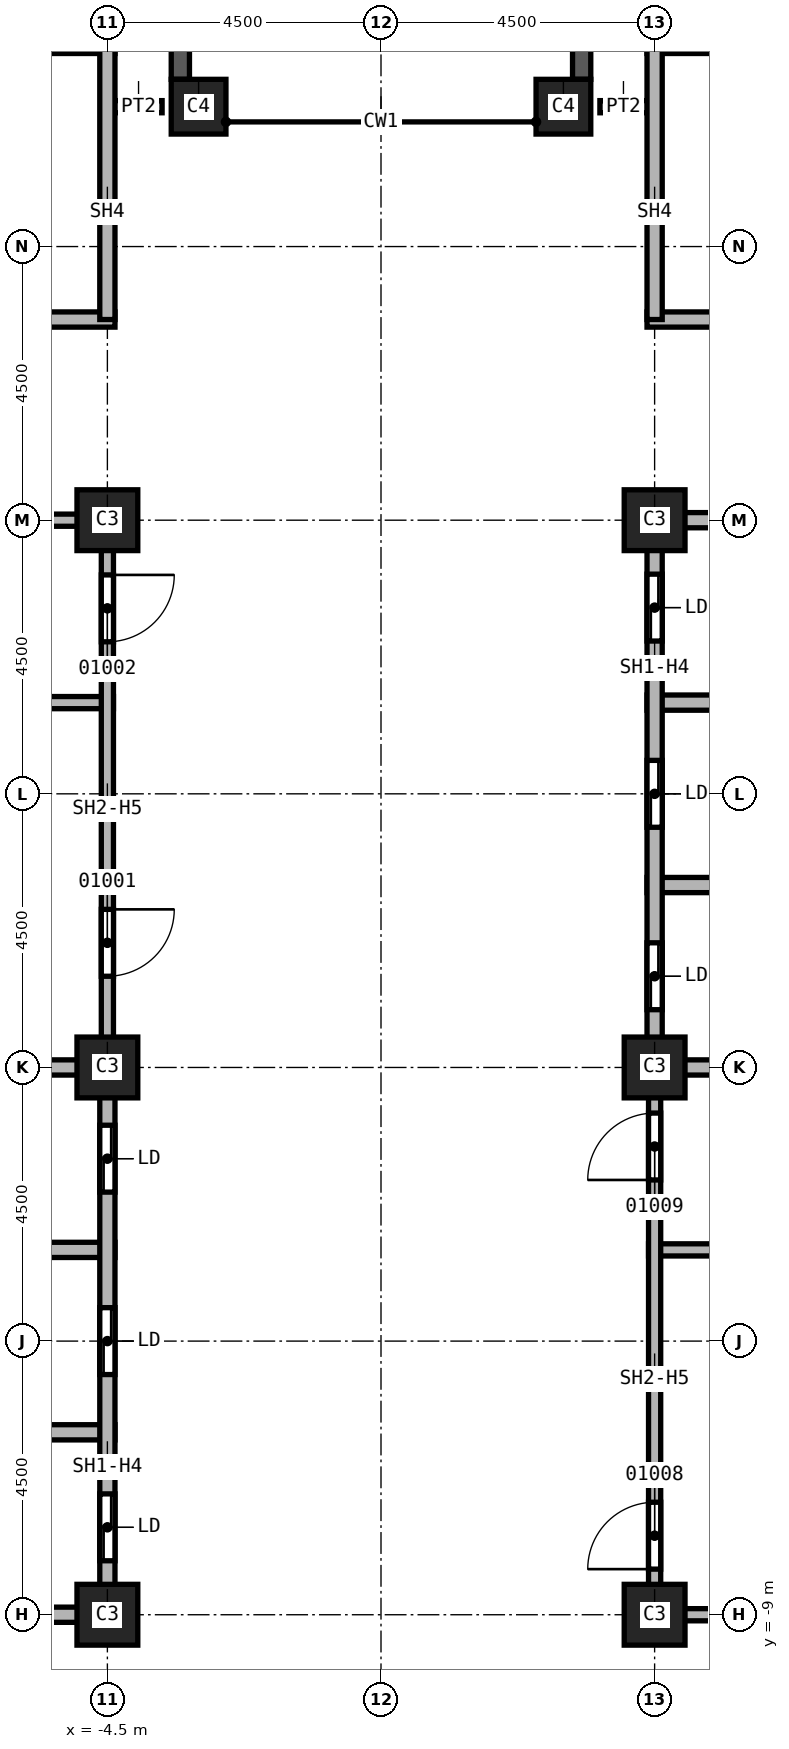
"""IFC4 building model, lengths in metres.
Left out: names, types, materials, properties, quantities, classifications, styles, units other than length and angle.
Written with IfcOpenShell. Run it as: python <this file> out.ifc"""

import sys

from ifc_helpers import new_model, si_unit, direction, frame, frame_2d, origin, origin_2d, place, context, subcontext, project, spatial, rectangle, extrude, element, fill, save


model = new_model("IFC4")
c1 = context("Model", 3, precision=1e-05, world=origin(), true_north=direction((0.0, 1.0)))
c2 = subcontext(c1, "Body", "Model", "MODEL_VIEW")
j1 = project(units=[si_unit("LENGTHUNIT", "METRE"), si_unit("PLANEANGLEUNIT", "RADIAN")], contexts=[c1])
p1 = place(None, origin())
s1 = spatial("IfcSite", under=j1, at=p1, CompositionType="ELEMENT")
p2 = place(p1, origin())
s2 = spatial("IfcBuilding", under=s1, at=p2, CompositionType="ELEMENT")
p3 = place(p2, frame((0.0, 0.0, 72.0)))
s3 = spatial("IfcBuildingStorey", under=s2, at=p3, CompositionType="ELEMENT", Elevation=72.0)
for number, where, z_axis, x_axis in (
    (1, (4.5, 0.0, 0.0), (0.0, 0.0, 1.0), (1.0, 0.0, 0.0)),
    (2, (4.5, 9.0, 0.0), (0.0, 0.0, 1.0), (1.0, 0.0, 0.0)),
    (3, (4.5, -9.0, 0.0), (0.0, 0.0, 1.0), (1.0, 0.0, 0.0)),
    (4, (-4.5, 0.0, 0.0), (0.0, 0.0, 1.0), (1.0, 0.0, 0.0)),
    (5, (-4.5, 9.0, 0.0), (0.0, 0.0, 1.0), (1.0, 0.0, 0.0)),
    (6, (-4.5, -9.0, 0.0), (0.0, 0.0, 1.0), (1.0, 0.0, 0.0)),
):
    element("IfcColumn", number, at=place(p3, frame(where, z_axis=z_axis, x_axis=x_axis)), inside=s3, PredefinedType="COLUMN", context=c2, shape_type="SweptSolid", body=[
        extrude(rectangle(XDim=1.0, YDim=1.0, at=origin_2d()), origin(), (0.0, 0.0, 1.0), 3.7),
    ])
for number, where, z_axis, x_axis in (
    (7, (3.0, 15.8, 0.0), (0.0, 0.0, 1.0), (1.0, 0.0, 0.0)),
    (8, (-3.0, 15.8, 0.0), (0.0, 0.0, 1.0), (1.0, 0.0, 0.0)),
):
    element("IfcColumn", number, at=place(p3, frame(where, z_axis=z_axis, x_axis=x_axis)), inside=s3, PredefinedType="COLUMN", context=c2, shape_type="SweptSolid", body=[
        extrude(rectangle(XDim=0.9, YDim=0.9, at=origin_2d()), origin(), (0.0, 0.0, 1.0), 3.7),
    ])
p4 = place(p3, frame((3.3, 24.2, 0.0), z_axis=(0.0, 0.0, 1.0), x_axis=(0.0, -1.0, 0.0)))
e9 = element("IfcWall", 9, at=p4, inside=s3, PredefinedType="SOLIDWALL", context=c2, shape_type="SweptSolid", body=[
    extrude(rectangle(XDim=7.95, YDim=0.3, at=frame_2d((3.975, 0.0))), origin(), (0.0, 0.0, 1.0), 3.1),
])
p5 = place(p4, frame((0.788, 0.0, 0.8)))
e10 = element("IfcOpeningElement", 10, at=p5, cuts=e9, PredefinedType="OPENING", context=c2, shape_type="SweptSolid", body=[
    extrude(rectangle(XDim=2.4, YDim=1.95, at=frame_2d((1.2, 0.975))), frame((0.0, 0.15, 0.0), z_axis=(0.0, -1.0, 0.0), x_axis=(1.0, 0.0, 0.0)), (0.0, 0.0, 1.0), 0.3),
])
p6 = place(p4, frame((4.762, 0.0, 0.8)))
e11 = element("IfcOpeningElement", 11, at=p6, cuts=e9, PredefinedType="OPENING", context=c2, shape_type="SweptSolid", body=[
    extrude(rectangle(XDim=2.4, YDim=1.95, at=frame_2d((1.2, 0.975))), frame((0.0, 0.15, 0.0), z_axis=(0.0, -1.0, 0.0), x_axis=(1.0, 0.0, 0.0)), (0.0, 0.0, 1.0), 0.3),
])
p7 = place(p3, frame((-3.3, 16.25, 0.0), z_axis=(0.0, 0.0, 1.0), x_axis=(0.0, 1.0, 0.0)))
e12 = element("IfcWall", 12, at=p7, inside=s3, PredefinedType="SOLIDWALL", context=c2, shape_type="SweptSolid", body=[
    extrude(rectangle(XDim=7.95, YDim=0.3, at=frame_2d((3.975, 0.0))), origin(), (0.0, 0.0, 1.0), 3.1),
])
p8 = place(p7, frame((0.788, 0.0, 0.8)))
e13 = element("IfcOpeningElement", 13, at=p8, cuts=e12, PredefinedType="OPENING", context=c2, shape_type="SweptSolid", body=[
    extrude(rectangle(XDim=2.4, YDim=1.95, at=frame_2d((1.2, 0.975))), frame((0.0, 0.15, 0.0), z_axis=(0.0, -1.0, 0.0), x_axis=(1.0, 0.0, 0.0)), (0.0, 0.0, 1.0), 0.3),
])
p9 = place(p7, frame((4.762, 0.0, 0.8)))
e14 = element("IfcOpeningElement", 14, at=p9, cuts=e12, PredefinedType="OPENING", context=c2, shape_type="SweptSolid", body=[
    extrude(rectangle(XDim=2.4, YDim=1.95, at=frame_2d((1.2, 0.975))), frame((0.0, 0.15, 0.0), z_axis=(0.0, -1.0, 0.0), x_axis=(1.0, 0.0, 0.0)), (0.0, 0.0, 1.0), 0.3),
])
for number, where, z_axis, x_axis in (
    (15, (-4.5, 15.8, 0.0), (0.0, 0.0, 1.0), (1.0, 0.0, 0.0)),
    (16, (3.6, 15.8, 0.0), (0.0, 0.0, 1.0), (1.0, 0.0, 0.0)),
):
    element("IfcWall", number, at=place(p3, frame(where, z_axis=z_axis, x_axis=x_axis)), inside=s3, PredefinedType="PARTITIONING", context=c2, shape_type="SweptSolid", body=[
        extrude(rectangle(XDim=0.9, YDim=0.2, at=frame_2d((0.45, 0.0))), origin(), (0.0, 0.0, 1.0), 3.7),
    ])
p10 = place(p3, frame((-7.6, 6.0, 0.0), z_axis=(0.0, 0.0, 1.0), x_axis=(1.0, 0.0, 0.0)))
e17 = element("IfcWall", 17, at=p10, inside=s3, PredefinedType="SOLIDWALL", context=c2, shape_type="SweptSolid", body=[
    extrude(rectangle(XDim=3.2, YDim=0.2, at=frame_2d((1.6, 0.0))), origin(), (0.0, 0.0, 1.0), 3.7),
])
p11 = place(p3, frame((-7.5, 9.0, 0.0), z_axis=(0.0, 0.0, 1.0), x_axis=(1.0, 0.0, 0.0)))
e18 = element("IfcWall", 18, at=p11, inside=s3, PredefinedType="SOLIDWALL", context=c2, shape_type="SweptSolid", body=[
    extrude(rectangle(XDim=3.0, YDim=0.2, at=frame_2d((1.5, 0.0))), origin(), (0.0, 0.0, 1.0), 2.938),
])
p12 = place(p3, frame((-4.5, 9.1, 0.0), z_axis=(0.0, 0.0, 1.0), x_axis=(0.0, -1.0, 0.0)))
e19 = element("IfcWall", 19, at=p12, inside=s3, PredefinedType="SOLIDWALL", context=c2, shape_type="SweptSolid", body=[
    extrude(rectangle(XDim=9.1, YDim=0.2, at=frame_2d((4.55, 0.0))), origin(), (0.0, 0.0, 1.0), 2.938),
])
p13 = place(p12, frame((6.5, 0.0, 0.0)))
e20 = element("IfcOpeningElement", 20, at=p13, cuts=e19, PredefinedType="OPENING", context=c2, shape_type="SweptSolid", body=[
    extrude(rectangle(XDim=1.1, YDim=2.1, at=frame_2d((0.55, 1.05))), frame((0.0, 0.1, 0.0), z_axis=(0.0, -1.0, 0.0), x_axis=(1.0, 0.0, 0.0)), (0.0, 0.0, 1.0), 0.2),
])
p14 = place(p12, frame((1.0, 0.0, 0.0)))
e21 = element("IfcOpeningElement", 21, at=p14, cuts=e19, PredefinedType="OPENING", context=c2, shape_type="SweptSolid", body=[
    extrude(rectangle(XDim=1.1, YDim=2.1, at=frame_2d((0.55, 1.05))), frame((0.0, 0.1, 0.0), z_axis=(0.0, -1.0, 0.0), x_axis=(1.0, 0.0, 0.0)), (0.0, 0.0, 1.0), 0.2),
])
p15 = place(p3, frame((4.4, -3.0, 0.0), z_axis=(0.0, 0.0, 1.0), x_axis=(1.0, 0.0, 0.0)))
e22 = element("IfcWall", 22, at=p15, inside=s3, PredefinedType="SOLIDWALL", context=c2, shape_type="SweptSolid", body=[
    extrude(rectangle(XDim=3.225, YDim=0.2, at=frame_2d((1.613, 0.0))), origin(), (0.0, 0.0, 1.0), 3.7),
])
p16 = place(p3, frame((4.5, -9.1, 0.0), z_axis=(0.0, 0.0, 1.0), x_axis=(0.0, 1.0, 0.0)))
e23 = element("IfcWall", 23, at=p16, inside=s3, PredefinedType="SOLIDWALL", context=c2, shape_type="SweptSolid", body=[
    extrude(rectangle(XDim=9.1, YDim=0.2, at=frame_2d((4.55, 0.0))), origin(), (0.0, 0.0, 1.0), 2.938),
])
p17 = place(p16, frame((0.85, 0.0, 0.0)))
e24 = element("IfcOpeningElement", 24, at=p17, cuts=e23, PredefinedType="OPENING", context=c2, shape_type="SweptSolid", body=[
    extrude(rectangle(XDim=1.1, YDim=2.1, at=frame_2d((0.55, 1.05))), frame((0.0, 0.1, 0.0), z_axis=(0.0, -1.0, 0.0), x_axis=(1.0, 0.0, 0.0)), (0.0, 0.0, 1.0), 0.2),
])
p18 = place(p16, frame((7.25, 0.0, 0.0)))
e25 = element("IfcOpeningElement", 25, at=p18, cuts=e23, PredefinedType="OPENING", context=c2, shape_type="SweptSolid", body=[
    extrude(rectangle(XDim=1.1, YDim=2.1, at=frame_2d((0.55, 1.05))), frame((0.0, 0.1, 0.0), z_axis=(0.0, -1.0, 0.0), x_axis=(1.0, 0.0, 0.0)), (0.0, 0.0, 1.0), 0.2),
])
p19 = place(p3, frame((7.5, -9.0, 0.0), z_axis=(0.0, 0.0, 1.0), x_axis=(-1.0, 0.0, 0.0)))
e26 = element("IfcWall", 26, at=p19, inside=s3, PredefinedType="SOLIDWALL", context=c2, shape_type="SweptSolid", body=[
    extrude(rectangle(XDim=3.0, YDim=0.2, at=frame_2d((1.5, 0.0))), origin(), (0.0, 0.0, 1.0), 2.938),
])
p20 = place(p3, frame((-13.625, -3.0, 0.0), z_axis=(0.0, 0.0, 1.0), x_axis=(1.0, 0.0, 0.0)))
e27 = element("IfcWall", 27, at=p20, inside=s3, PredefinedType="SOLIDWALL", context=c2, shape_type="SweptSolid", body=[
    extrude(rectangle(XDim=9.25, YDim=0.25, at=frame_2d((4.625, 0.0))), origin(), (0.0, 0.0, 1.0), 3.7),
])
p21 = place(p20, frame((3.25, 0.0, 0.0)))
e28 = element("IfcOpeningElement", 28, at=p21, cuts=e27, PredefinedType="OPENING", context=c2, shape_type="SweptSolid", body=[
    extrude(rectangle(XDim=1.1, YDim=2.1, at=frame_2d((0.55, 1.05))), frame((0.0, 0.125, 0.0), z_axis=(0.0, -1.0, 0.0), x_axis=(1.0, 0.0, 0.0)), (0.0, 0.0, 1.0), 0.25),
])
for number, where, z_axis, x_axis in (
    (29, (-7.625, -6.0, 0.0), (0.0, 0.0, 1.0), (1.0, 0.0, 0.0)),
    (30, (-7.625, 0.0, 0.0), (0.0, 0.0, 1.0), (1.0, 0.0, 0.0)),
):
    element("IfcWall", number, at=place(p3, frame(where, z_axis=z_axis, x_axis=x_axis)), inside=s3, PredefinedType="SOLIDWALL", context=c2, shape_type="SweptSolid", body=[
        extrude(rectangle(XDim=3.25, YDim=0.25, at=frame_2d((1.625, 0.0))), origin(), (0.0, 0.0, 1.0), 3.7),
    ])
p22 = place(p3, frame((-4.5, -9.0, 0.0), z_axis=(0.0, 0.0, 1.0), x_axis=(-1.0, 0.0, 0.0)))
e31 = element("IfcWall", 31, at=p22, inside=s3, PredefinedType="SOLIDWALL", context=c2, shape_type="SweptSolid", body=[
    extrude(rectangle(XDim=3.0, YDim=0.25, at=frame_2d((1.5, 0.0))), origin(), (0.0, 0.0, 1.0), 2.938),
])
p23 = place(p3, frame((-4.5, 0.0, 0.0), z_axis=(0.0, 0.0, 1.0), x_axis=(0.0, -1.0, 0.0)))
e32 = element("IfcWall", 32, at=p23, inside=s3, PredefinedType="SOLIDWALL", context=c2, shape_type="SweptSolid", body=[
    extrude(rectangle(XDim=9.125, YDim=0.25, at=frame_2d((4.562, 0.0))), origin(), (0.0, 0.0, 1.0), 2.938),
])
p24 = place(p23, frame((7.012, 0.0, 0.0)))
e33 = element("IfcOpeningElement", 33, at=p24, cuts=e32, PredefinedType="OPENING", context=c2, shape_type="SweptSolid", body=[
    extrude(rectangle(XDim=1.1, YDim=2.1, at=frame_2d((0.55, 1.05))), frame((0.0, 0.125, 0.0), z_axis=(0.0, -1.0, 0.0), x_axis=(1.0, 0.0, 0.0)), (0.0, 0.0, 1.0), 0.25),
])
p25 = place(p23, frame((3.95, 0.0, 0.0)))
e34 = element("IfcOpeningElement", 34, at=p25, cuts=e32, PredefinedType="OPENING", context=c2, shape_type="SweptSolid", body=[
    extrude(rectangle(XDim=1.1, YDim=2.1, at=frame_2d((0.55, 1.05))), frame((0.0, 0.125, 0.0), z_axis=(0.0, -1.0, 0.0), x_axis=(1.0, 0.0, 0.0)), (0.0, 0.0, 1.0), 0.25),
])
p26 = place(p23, frame((0.95, 0.0, 0.0)))
e35 = element("IfcOpeningElement", 35, at=p26, cuts=e32, PredefinedType="OPENING", context=c2, shape_type="SweptSolid", body=[
    extrude(rectangle(XDim=1.1, YDim=2.1, at=frame_2d((0.55, 1.05))), frame((0.0, 0.125, 0.0), z_axis=(0.0, -1.0, 0.0), x_axis=(1.0, 0.0, 0.0)), (0.0, 0.0, 1.0), 0.25),
])
p27 = place(p3, frame((4.375, 0.0, 0.0), z_axis=(0.0, 0.0, 1.0), x_axis=(1.0, 0.0, 0.0)))
e36 = element("IfcWall", 36, at=p27, inside=s3, PredefinedType="SOLIDWALL", context=c2, shape_type="SweptSolid", body=[
    extrude(rectangle(XDim=3.25, YDim=0.25, at=frame_2d((1.625, 0.0))), origin(), (0.0, 0.0, 1.0), 3.7),
])
p28 = place(p3, frame((4.375, 3.0, 0.0), z_axis=(0.0, 0.0, 1.0), x_axis=(1.0, 0.0, 0.0)))
e37 = element("IfcWall", 37, at=p28, inside=s3, PredefinedType="SOLIDWALL", context=c2, shape_type="SweptSolid", body=[
    extrude(rectangle(XDim=9.25, YDim=0.25, at=frame_2d((4.625, 0.0))), origin(), (0.0, 0.0, 1.0), 3.7),
])
p29 = place(p28, frame((3.375, 0.0, 0.0)))
e38 = element("IfcOpeningElement", 38, at=p29, cuts=e37, PredefinedType="OPENING", context=c2, shape_type="SweptSolid", body=[
    extrude(rectangle(XDim=1.1, YDim=2.1, at=frame_2d((0.55, 1.05))), frame((0.0, 0.125, 0.0), z_axis=(0.0, -1.0, 0.0), x_axis=(1.0, 0.0, 0.0)), (0.0, 0.0, 1.0), 0.25),
])
p30 = place(p3, frame((4.375, 6.0, 0.0), z_axis=(0.0, 0.0, 1.0), x_axis=(1.0, 0.0, 0.0)))
e39 = element("IfcWall", 39, at=p30, inside=s3, PredefinedType="SOLIDWALL", context=c2, shape_type="SweptSolid", body=[
    extrude(rectangle(XDim=3.25, YDim=0.25, at=frame_2d((1.625, 0.0))), origin(), (0.0, 0.0, 1.0), 3.7),
])
p31 = place(p3, frame((4.5, 0.0, 0.0), z_axis=(0.0, 0.0, 1.0), x_axis=(0.0, 1.0, 0.0)))
e40 = element("IfcWall", 40, at=p31, inside=s3, PredefinedType="SOLIDWALL", context=c2, shape_type="SweptSolid", body=[
    extrude(rectangle(XDim=9.125, YDim=0.25, at=frame_2d((4.562, 0.0))), origin(), (0.0, 0.0, 1.0), 2.938),
])
p32 = place(p31, frame((0.95, 0.0, 0.0)))
e41 = element("IfcOpeningElement", 41, at=p32, cuts=e40, PredefinedType="OPENING", context=c2, shape_type="SweptSolid", body=[
    extrude(rectangle(XDim=1.1, YDim=2.1, at=frame_2d((0.55, 1.05))), frame((0.0, 0.125, 0.0), z_axis=(0.0, -1.0, 0.0), x_axis=(1.0, 0.0, 0.0)), (0.0, 0.0, 1.0), 0.25),
])
p33 = place(p31, frame((3.95, 0.0, 0.0)))
e42 = element("IfcOpeningElement", 42, at=p33, cuts=e40, PredefinedType="OPENING", context=c2, shape_type="SweptSolid", body=[
    extrude(rectangle(XDim=1.1, YDim=2.1, at=frame_2d((0.55, 1.05))), frame((0.0, 0.125, 0.0), z_axis=(0.0, -1.0, 0.0), x_axis=(1.0, 0.0, 0.0)), (0.0, 0.0, 1.0), 0.25),
])
p34 = place(p31, frame((7.012, 0.0, 0.0)))
e43 = element("IfcOpeningElement", 43, at=p34, cuts=e40, PredefinedType="OPENING", context=c2, shape_type="SweptSolid", body=[
    extrude(rectangle(XDim=1.1, YDim=2.1, at=frame_2d((0.55, 1.05))), frame((0.0, 0.125, 0.0), z_axis=(0.0, -1.0, 0.0), x_axis=(1.0, 0.0, 0.0)), (0.0, 0.0, 1.0), 0.25),
])
p35 = place(p3, frame((4.5, 9.0, 0.0), z_axis=(0.0, 0.0, 1.0), x_axis=(1.0, 0.0, 0.0)))
e44 = element("IfcWall", 44, at=p35, inside=s3, PredefinedType="SOLIDWALL", context=c2, shape_type="SweptSolid", body=[
    extrude(rectangle(XDim=3.0, YDim=0.25, at=frame_2d((1.5, 0.0))), origin(), (0.0, 0.0, 1.0), 2.938),
])
p36 = place(p3, frame((-13.5, 12.3, 0.0), z_axis=(0.0, 0.0, 1.0), x_axis=(1.0, 0.0, 0.0)))
e45 = element("IfcWall", 45, at=p36, inside=s3, PredefinedType="SOLIDWALL", context=c2, shape_type="SweptSolid", body=[
    extrude(rectangle(XDim=9.125, YDim=0.25, at=frame_2d((4.562, 0.0))), origin(), (0.0, 0.0, 1.0), 3.7),
])
p37 = place(p36, frame((0.6, 0.0, 0.0)))
e46 = element("IfcOpeningElement", 46, at=p37, cuts=e45, PredefinedType="OPENING", context=c2, shape_type="SweptSolid", body=[
    extrude(rectangle(XDim=1.2, YDim=2.1, at=frame_2d((0.6, 1.05))), frame((0.0, 0.125, 0.0), z_axis=(0.0, -1.0, 0.0), x_axis=(1.0, 0.0, 0.0)), (0.0, 0.0, 1.0), 0.25),
])
p38 = place(p3, frame((-13.5, 16.8, 0.0), z_axis=(0.0, 0.0, 1.0), x_axis=(1.0, 0.0, 0.0)))
e47 = element("IfcWall", 47, at=p38, inside=s3, PredefinedType="SOLIDWALL", context=c2, shape_type="SweptSolid", body=[
    extrude(rectangle(XDim=9.125, YDim=0.25, at=frame_2d((4.562, 0.0))), origin(), (0.0, 0.0, 1.0), 3.7),
])
p39 = place(p3, frame((-4.5, 16.8, 0.0), z_axis=(0.0, 0.0, 1.0), x_axis=(0.0, -1.0, 0.0)))
e48 = element("IfcWall", 48, at=p39, inside=s3, PredefinedType="SOLIDWALL", context=c2, shape_type="SweptSolid", body=[
    extrude(rectangle(XDim=4.5, YDim=0.25, at=frame_2d((2.25, 0.0))), origin(), (0.0, 0.0, 1.0), 3.7),
])
p40 = place(p3, frame((4.375, 12.3, 0.0), z_axis=(0.0, 0.0, 1.0), x_axis=(1.0, 0.0, 0.0)))
e49 = element("IfcWall", 49, at=p40, inside=s3, PredefinedType="SOLIDWALL", context=c2, shape_type="SweptSolid", body=[
    extrude(rectangle(XDim=9.125, YDim=0.25, at=frame_2d((4.562, 0.0))), origin(), (0.0, 0.0, 1.0), 3.7),
])
p41 = place(p40, frame((7.2, 0.0, 0.0)))
e50 = element("IfcOpeningElement", 50, at=p41, cuts=e49, PredefinedType="OPENING", context=c2, shape_type="SweptSolid", body=[
    extrude(rectangle(XDim=1.2, YDim=2.1, at=frame_2d((0.6, 1.05))), frame((0.0, 0.125, 0.0), z_axis=(0.0, -1.0, 0.0), x_axis=(1.0, 0.0, 0.0)), (0.0, 0.0, 1.0), 0.25),
])
p42 = place(p3, frame((4.375, 16.8, 0.0), z_axis=(0.0, 0.0, 1.0), x_axis=(1.0, 0.0, 0.0)))
e51 = element("IfcWall", 51, at=p42, inside=s3, PredefinedType="SOLIDWALL", context=c2, shape_type="SweptSolid", body=[
    extrude(rectangle(XDim=9.125, YDim=0.25, at=frame_2d((4.562, 0.0))), origin(), (0.0, 0.0, 1.0), 3.7),
])
p43 = place(p3, frame((4.5, 12.3, 0.0), z_axis=(0.0, 0.0, 1.0), x_axis=(0.0, 1.0, 0.0)))
e52 = element("IfcWall", 52, at=p43, inside=s3, PredefinedType="SOLIDWALL", context=c2, shape_type="SweptSolid", body=[
    extrude(rectangle(XDim=4.5, YDim=0.25, at=frame_2d((2.25, 0.0))), origin(), (0.0, 0.0, 1.0), 3.7),
])
p44 = place(p13, origin())
e53 = element("IfcDoor", 53, at=p44, inside=s3, OperationType="SINGLE_SWING_RIGHT", PredefinedType="DOOR", context=c2, shape_type="SweptSolid", body=[
    extrude(rectangle(XDim=1.1, YDim=2.1, at=frame_2d((0.55, 1.05))), frame((0.0, 0.025, 0.0), z_axis=(0.0, -1.0, 0.0), x_axis=(1.0, 0.0, 0.0)), (0.0, 0.0, 1.0), 0.05),
])
fill(e20, e53)
p45 = place(p14, origin())
e54 = element("IfcDoor", 54, at=p45, inside=s3, OperationType="SINGLE_SWING_LEFT", PredefinedType="DOOR", context=c2, shape_type="SweptSolid", body=[
    extrude(rectangle(XDim=1.1, YDim=2.1, at=frame_2d((0.55, 1.05))), frame((0.0, 0.025, 0.0), z_axis=(0.0, -1.0, 0.0), x_axis=(1.0, 0.0, 0.0)), (0.0, 0.0, 1.0), 0.05),
])
fill(e21, e54)
p46 = place(p17, origin())
e55 = element("IfcDoor", 55, at=p46, inside=s3, OperationType="SINGLE_SWING_LEFT", PredefinedType="DOOR", context=c2, shape_type="SweptSolid", body=[
    extrude(rectangle(XDim=1.1, YDim=2.1, at=frame_2d((0.55, 1.05))), frame((0.0, 0.025, 0.0), z_axis=(0.0, -1.0, 0.0), x_axis=(1.0, 0.0, 0.0)), (0.0, 0.0, 1.0), 0.05),
])
fill(e24, e55)
p47 = place(p18, origin())
e56 = element("IfcDoor", 56, at=p47, inside=s3, OperationType="SINGLE_SWING_RIGHT", PredefinedType="DOOR", context=c2, shape_type="SweptSolid", body=[
    extrude(rectangle(XDim=1.1, YDim=2.1, at=frame_2d((0.55, 1.05))), frame((0.0, 0.025, 0.0), z_axis=(0.0, -1.0, 0.0), x_axis=(1.0, 0.0, 0.0)), (0.0, 0.0, 1.0), 0.05),
])
fill(e25, e56)
p48 = place(p24, origin())
e57 = element("IfcDoor", 57, at=p48, inside=s3, OperationType="SLIDING_TO_LEFT", PredefinedType="DOOR", context=c2, shape_type="SweptSolid", body=[
    extrude(rectangle(XDim=1.1, YDim=2.1, at=frame_2d((0.55, 1.05))), frame((0.0, 0.025, 0.0), z_axis=(0.0, -1.0, 0.0), x_axis=(1.0, 0.0, 0.0)), (0.0, 0.0, 1.0), 0.05),
])
fill(e33, e57)
p49 = place(p25, origin())
e58 = element("IfcDoor", 58, at=p49, inside=s3, OperationType="SLIDING_TO_LEFT", PredefinedType="DOOR", context=c2, shape_type="SweptSolid", body=[
    extrude(rectangle(XDim=1.1, YDim=2.1, at=frame_2d((0.55, 1.05))), frame((0.0, 0.025, 0.0), z_axis=(0.0, -1.0, 0.0), x_axis=(1.0, 0.0, 0.0)), (0.0, 0.0, 1.0), 0.05),
])
fill(e34, e58)
p50 = place(p26, origin())
e59 = element("IfcDoor", 59, at=p50, inside=s3, OperationType="SLIDING_TO_LEFT", PredefinedType="DOOR", context=c2, shape_type="SweptSolid", body=[
    extrude(rectangle(XDim=1.1, YDim=2.1, at=frame_2d((0.55, 1.05))), frame((0.0, 0.025, 0.0), z_axis=(0.0, -1.0, 0.0), x_axis=(1.0, 0.0, 0.0)), (0.0, 0.0, 1.0), 0.05),
])
fill(e35, e59)
p51 = place(p32, origin())
e60 = element("IfcDoor", 60, at=p51, inside=s3, OperationType="SLIDING_TO_LEFT", PredefinedType="DOOR", context=c2, shape_type="SweptSolid", body=[
    extrude(rectangle(XDim=1.1, YDim=2.1, at=frame_2d((0.55, 1.05))), frame((0.0, 0.025, 0.0), z_axis=(0.0, -1.0, 0.0), x_axis=(1.0, 0.0, 0.0)), (0.0, 0.0, 1.0), 0.05),
])
fill(e41, e60)
p52 = place(p33, origin())
e61 = element("IfcDoor", 61, at=p52, inside=s3, OperationType="SLIDING_TO_LEFT", PredefinedType="DOOR", context=c2, shape_type="SweptSolid", body=[
    extrude(rectangle(XDim=1.1, YDim=2.1, at=frame_2d((0.55, 1.05))), frame((0.0, 0.025, 0.0), z_axis=(0.0, -1.0, 0.0), x_axis=(1.0, 0.0, 0.0)), (0.0, 0.0, 1.0), 0.05),
])
fill(e42, e61)
p53 = place(p34, origin())
e62 = element("IfcDoor", 62, at=p53, inside=s3, OperationType="SLIDING_TO_LEFT", PredefinedType="DOOR", context=c2, shape_type="SweptSolid", body=[
    extrude(rectangle(XDim=1.1, YDim=2.1, at=frame_2d((0.55, 1.05))), frame((0.0, 0.025, 0.0), z_axis=(0.0, -1.0, 0.0), x_axis=(1.0, 0.0, 0.0)), (0.0, 0.0, 1.0), 0.05),
])
fill(e43, e62)
save(model, sys.argv[1])
